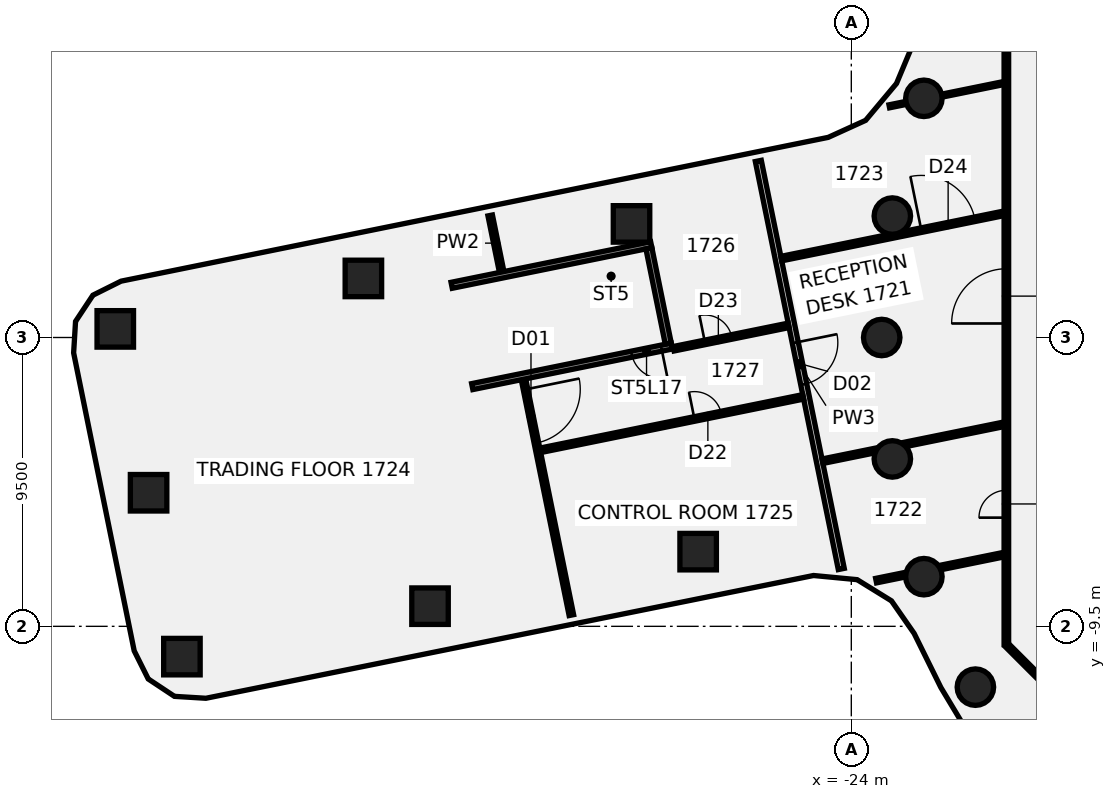
"""IFC4 building model, lengths in metres.
Left out: names, types, materials, properties, quantities, classifications, styles, units other than length and angle.
Written with IfcOpenShell. Run it as: python <this file> out.ifc"""

import sys

from ifc_helpers import new_model, si_unit, direction, frame, frame_2d, origin, origin_2d, place, context, subcontext, project, spatial, polyline, rectangle, circle, outline, extrude, element, fill, save


model = new_model("IFC4")
c1 = context("Model", 3, precision=1e-05, world=origin(), true_north=direction((0.0, 1.0)))
c2 = subcontext(c1, "Body", "Model", "MODEL_VIEW")
j1 = project(units=[si_unit("LENGTHUNIT", "METRE"), si_unit("PLANEANGLEUNIT", "RADIAN")], contexts=[c1])
p1 = place(None, origin())
s1 = spatial("IfcSite", under=j1, at=p1, CompositionType="ELEMENT")
p2 = place(p1, origin())
s2 = spatial("IfcBuilding", under=s1, at=p2, CompositionType="ELEMENT")
p3 = place(p2, frame((0.0, 0.0, 75.25)))
s3 = spatial("IfcBuildingStorey", under=s2, at=p3, CompositionType="ELEMENT", Elevation=75.25)
for number, where, z_axis, x_axis in (
    (1, (-21.613, 7.866, -0.14), (0.0, 0.0, 1.0), (1.0, 0.0, 0.0)),
    (2, (-22.651, 3.994, -0.14), (0.0, 0.0, 1.0), (1.0, 0.0, 0.0)),
    (3, (-23.0, 0.0, -0.14), (0.0, 0.0, 1.0), (1.0, 0.0, 0.0)),
    (4, (-22.651, -3.994, -0.14), (0.0, 0.0, 1.0), (1.0, 0.0, 0.0)),
    (5, (-21.613, -7.866, -0.14), (0.0, 0.0, 1.0), (1.0, 0.0, 0.0)),
    (6, (-19.919, -11.5, -0.14), (0.0, 0.0, 1.0), (1.0, 0.0, 0.0)),
):
    element("IfcColumn", number, at=place(p3, frame(where, z_axis=z_axis, x_axis=x_axis)), inside=s3, PredefinedType="COLUMN", context=c2, shape_type="SweptSolid", body=[
        extrude(circle(Radius=0.6, at=origin_2d()), origin(), (0.0, 0.0, 1.0), 3.71),
    ])
p4 = place(p3, frame((-37.857, -8.837, -0.138), z_axis=(0.043948835728, -0.07725535249, 0.996042223176), x_axis=(-0.197093187203, 0.97674033462, 0.084454687756)))
e7 = element("IfcColumn", 7, at=p4, inside=s3, PredefinedType="COLUMN", context=c2, shape_type="SweptSolid", body=[
    extrude(rectangle(XDim=1.2, YDim=1.2, at=origin_2d()), origin(), (0.0, 0.0, 1.0), 3.716),
])
p5 = place(p3, frame((-40.049, 1.943, -0.138), z_axis=(-0.008673247864, -0.088440845648, 0.996043669521), x_axis=(0.979765603585, 0.198432607845, 0.026150758614)))
e8 = element("IfcColumn", 8, at=p5, inside=s3, PredefinedType="COLUMN", context=c2, shape_type="SweptSolid", body=[
    extrude(rectangle(XDim=1.2, YDim=1.2, at=origin_2d()), origin(), (0.0, 0.0, 1.0), 3.716),
])
p6 = place(p3, frame((-29.038, -7.043, -0.139), z_axis=(0.034891014198, -0.034232693176, 0.998804655499), x_axis=(-0.198537646121, 0.979256198152, 0.040498166061)))
e9 = element("IfcColumn", 9, at=p6, inside=s3, PredefinedType="COLUMN", context=c2, shape_type="SweptSolid", body=[
    extrude(rectangle(XDim=1.2, YDim=1.2, at=origin_2d()), origin(), (0.0, 0.0, 1.0), 3.708),
])
p7 = place(p3, frame((-31.229, 3.736, -0.139), z_axis=(-0.017907556487, -0.045427257265, 0.99880713039), x_axis=(0.979708767156, 0.198653368973, 0.026600198356)))
e10 = element("IfcColumn", 10, at=p7, inside=s3, PredefinedType="COLUMN", context=c2, shape_type="SweptSolid", body=[
    extrude(rectangle(XDim=1.2, YDim=1.2, at=origin_2d()), origin(), (0.0, 0.0, 1.0), 3.708),
])
p8 = place(p3, frame((-48.21, 0.283, -0.138), z_axis=(0.002356773352, -0.127200295059, 0.991874251383), x_axis=(0.979992577374, 0.197697779503, 0.023024688323)))
e11 = element("IfcColumn", 11, at=p8, inside=s3, PredefinedType="COLUMN", context=c2, shape_type="SweptSolid", body=[
    extrude(rectangle(XDim=1.2, YDim=1.2, at=origin_2d()), origin(), (0.0, 0.0, 1.0), 3.729),
])
p9 = place(p3, frame((-47.114, -5.106, -0.138), z_axis=(0.028607271039, -0.121695461927, 0.992155148447), x_axis=(-0.197441138054, 0.972318457177, 0.124955251334)))
e12 = element("IfcColumn", 12, at=p9, inside=s3, PredefinedType="COLUMN", context=c2, shape_type="SweptSolid", body=[
    extrude(rectangle(XDim=1.2, YDim=1.2, at=origin_2d()), origin(), (0.0, 0.0, 1.0), 3.729),
])
p10 = place(p3, frame((-46.018, -10.496, -0.138), z_axis=(0.054848749218, -0.116046339335, 0.991728219744), x_axis=(-0.1960216138, 0.972644227532, 0.124654456691)))
e13 = element("IfcColumn", 13, at=p10, inside=s3, PredefinedType="COLUMN", context=c2, shape_type="SweptSolid", body=[
    extrude(rectangle(XDim=1.2, YDim=1.2, at=origin_2d()), origin(), (0.0, 0.0, 1.0), 3.73),
])
p11 = place(p3, frame((-35.878, 4.014, 0.0), z_axis=(0.0, 0.0, 1.0), x_axis=(0.199020498729, -0.979995327073, 0.0)))
e14 = element("IfcWall", 14, at=p11, inside=s3, PredefinedType="PARTITIONING", context=c2, shape_type="SweptSolid", body=[
    extrude(rectangle(XDim=1.858, YDim=0.15, at=frame_2d((0.929, 0.0))), origin(), (0.0, 0.0, 1.0), 2.97),
])
p12 = place(p3, frame((-34.775, -1.414, 0.0), z_axis=(0.0, 0.0, 1.0), x_axis=(0.199048758303, -0.979989587607, 0.0)))
e15 = element("IfcWall", 15, at=p12, inside=s3, PredefinedType="PARTITIONING", context=c2, shape_type="SweptSolid", body=[
    extrude(rectangle(XDim=7.874, YDim=0.15, at=frame_2d((3.937, 0.0))), origin(), (0.0, 0.0, 1.0), 2.97),
])
p13 = place(p12, frame((0.3, 0.0, 0.0)))
e16 = element("IfcOpeningElement", 16, at=p13, cuts=e15, PredefinedType="OPENING", context=c2, shape_type="SweptSolid", body=[
    extrude(rectangle(XDim=1.8, YDim=2.1, at=frame_2d((0.9, 1.05))), frame((0.0, 0.085, 0.0), z_axis=(0.0, -1.0, 0.0), x_axis=(1.0, 0.0, 0.0)), (0.0, 0.0, 1.0), 0.17),
])
p14 = place(p3, frame((-27.059, 5.808, 0.0), z_axis=(0.0, 0.0, 1.0), x_axis=(0.199248511138, -0.979948993984, 0.0)))
e17 = element("IfcWall", 17, at=p14, inside=s3, PredefinedType="PARTITIONING", context=c2, shape_type="SweptSolid", body=[
    extrude(rectangle(XDim=13.695, YDim=0.2, at=frame_2d((6.848, 0.0))), origin(), (0.0, 0.0, 1.0), 2.87),
])
p15 = place(p14, frame((6.099, 0.0, 0.0)))
e18 = element("IfcOpeningElement", 18, at=p15, cuts=e17, PredefinedType="OPENING", context=c2, shape_type="SweptSolid", body=[
    extrude(rectangle(XDim=1.4, YDim=2.1, at=frame_2d((0.7, 1.05))), frame((0.0, 0.11, 0.0), z_axis=(0.0, -1.0, 0.0), x_axis=(1.0, 0.0, 0.0)), (0.0, 0.0, 1.0), 0.22),
])
p16 = place(p3, frame((-18.872, -10.128, 0.0), z_axis=(0.0, 0.0, 1.0), x_axis=(0.707106781187, -0.707106781187, 0.0)))
e19 = element("IfcWall", 19, at=p16, inside=s3, PredefinedType="PARTITIONING", context=c2, shape_type="SweptSolid", body=[
    extrude(rectangle(XDim=2.465, YDim=0.15, at=frame_2d((1.232, 0.0))), origin(), (0.0, 0.0, 1.0), 2.97),
])
p17 = place(p3, frame((-34.23, -3.711, 0.0), z_axis=(0.0, 0.0, 1.0), x_axis=(0.979947834189, 0.199254215184, 0.0)))
e20 = element("IfcWall", 20, at=p17, inside=s3, PredefinedType="PARTITIONING", context=c2, shape_type="SweptSolid", body=[
    extrude(rectangle(XDim=8.824, YDim=0.15, at=frame_2d((4.412, 0.0))), origin(), (0.0, 0.0, 1.0), 2.87),
])
p18 = place(p17, frame((5.175, 0.0, 0.0)))
e21 = element("IfcOpeningElement", 21, at=p18, cuts=e20, PredefinedType="OPENING", context=c2, shape_type="SweptSolid", body=[
    extrude(rectangle(XDim=0.9, YDim=2.1, at=frame_2d((0.45, 1.05))), frame((0.0, 0.085, 0.0), z_axis=(0.0, -1.0, 0.0), x_axis=(1.0, 0.0, 0.0)), (0.0, 0.0, 1.0), 0.17),
])
p19 = place(p3, frame((-29.844, -0.37, 0.0), z_axis=(0.0, 0.0, 1.0), x_axis=(0.979938127912, 0.199301945462, 0.0)))
e22 = element("IfcWall", 22, at=p19, inside=s3, PredefinedType="PARTITIONING", context=c2, shape_type="SweptSolid", body=[
    extrude(rectangle(XDim=3.86, YDim=0.15, at=frame_2d((1.93, 0.0))), origin(), (0.0, 0.0, 1.0), 2.87),
])
p20 = place(p19, frame((1.05, 0.0, 0.0)))
e23 = element("IfcOpeningElement", 23, at=p20, cuts=e22, PredefinedType="OPENING", context=c2, shape_type="SweptSolid", body=[
    extrude(rectangle(XDim=0.9, YDim=2.1, at=frame_2d((0.45, 1.05))), frame((0.0, 0.085, 0.0), z_axis=(0.0, -1.0, 0.0), x_axis=(1.0, 0.0, 0.0)), (0.0, 0.0, 1.0), 0.17),
])
p21 = place(p3, frame((-26.303, 2.595, 0.0), z_axis=(0.0, 0.0, 1.0), x_axis=(0.979950490728, 0.19924114967, 0.0)))
e24 = element("IfcWall", 24, at=p21, inside=s3, PredefinedType="PARTITIONING", context=c2, shape_type="SweptSolid", body=[
    extrude(rectangle(XDim=7.479, YDim=0.15, at=frame_2d((3.74, 0.0))), origin(), (0.0, 0.0, 1.0), 2.87),
])
p22 = place(p21, frame((4.7, 0.0, 0.0)))
e25 = element("IfcOpeningElement", 25, at=p22, cuts=e24, PredefinedType="OPENING", context=c2, shape_type="SweptSolid", body=[
    extrude(rectangle(XDim=1.8, YDim=2.1, at=frame_2d((0.9, 1.05))), frame((0.0, 0.085, 0.0), z_axis=(0.0, -1.0, 0.0), x_axis=(1.0, 0.0, 0.0)), (0.0, 0.0, 1.0), 0.17),
])
p23 = place(p3, frame((-24.948, -4.069, 0.0), z_axis=(0.0, 0.0, 1.0), x_axis=(0.979938907772, 0.199298110967, 0.0)))
e26 = element("IfcWall", 26, at=p23, inside=s3, PredefinedType="PARTITIONING", context=c2, shape_type="SweptSolid", body=[
    extrude(rectangle(XDim=1.8, YDim=0.15, at=frame_2d((0.9, 0.0))), origin(), (0.0, 0.0, 1.0), 2.87),
])
p24 = place(p3, frame((-22.284, -3.527, 0.0), z_axis=(0.0, 0.0, 1.0), x_axis=(0.979950296152, 0.199242106673, 0.0)))
e27 = element("IfcWall", 27, at=p24, inside=s3, PredefinedType="PARTITIONING", context=c2, shape_type="SweptSolid", body=[
    extrude(rectangle(XDim=3.378, YDim=0.15, at=frame_2d((1.689, 0.0))), origin(), (0.0, 0.0, 1.0), 2.97),
])
p25 = place(p3, frame((-22.751, 7.603, 0.0), z_axis=(0.0, 0.0, 1.0), x_axis=(0.980025828953, 0.1988702456, 0.0)))
e28 = element("IfcWall", 28, at=p25, inside=s3, PredefinedType="PARTITIONING", context=c2, shape_type="SweptSolid", body=[
    extrude(rectangle(XDim=0.579, YDim=0.1, at=frame_2d((0.29, 0.0))), origin(), (0.0, 0.0, 1.0), 2.97),
])
p26 = place(p3, frame((-21.026, 7.954, 0.0), z_axis=(0.0, 0.0, 1.0), x_axis=(0.979967824394, 0.19915587652, 0.0)))
e29 = element("IfcWall", 29, at=p26, inside=s3, PredefinedType="PARTITIONING", context=c2, shape_type="SweptSolid", body=[
    extrude(rectangle(XDim=2.1, YDim=0.1, at=frame_2d((1.05, 0.0))), origin(), (0.0, 0.0, 1.0), 2.97),
])
p27 = place(p3, frame((-23.185, -7.997, 0.0), z_axis=(0.0, 0.0, 1.0), x_axis=(0.979965738982, 0.199166137736, 0.0)))
e30 = element("IfcWall", 30, at=p27, inside=s3, PredefinedType="PARTITIONING", context=c2, shape_type="SweptSolid", body=[
    extrude(rectangle(XDim=1.0, YDim=0.15, at=frame_2d((0.5, 0.0))), origin(), (0.0, 0.0, 1.0), 2.97),
])
p28 = place(p3, frame((-21.083, -7.569, 0.0), z_axis=(0.0, 0.0, 1.0), x_axis=(0.979916380724, 0.199408843305, 0.0)))
e31 = element("IfcWall", 31, at=p28, inside=s3, PredefinedType="PARTITIONING", context=c2, shape_type="SweptSolid", body=[
    extrude(rectangle(XDim=2.152, YDim=0.15, at=frame_2d((1.076, 0.0))), origin(), (0.0, 0.0, 1.0), 2.97),
])
p29 = place(p3, frame((-18.9, -10.1, 0.0), z_axis=(0.0, 0.0, 1.0), x_axis=(0.0, 1.0, 0.0)))
e32 = element("IfcWall", 32, at=p29, inside=s3, PredefinedType="PARTITIONING", context=c2, shape_type="SweptSolid", body=[
    extrude(rectangle(XDim=20.2, YDim=0.15, at=frame_2d((10.1, 0.0))), origin(), (0.0, 0.0, 1.0), 2.97),
])
p30 = place(p29, frame((10.561, 0.0, 0.0)))
e33 = element("IfcOpeningElement", 33, at=p30, cuts=e32, PredefinedType="OPENING", context=c2, shape_type="SweptSolid", body=[
    extrude(rectangle(XDim=1.8, YDim=2.1, at=frame_2d((0.9, 1.05))), frame((0.0, 0.085, 0.0), z_axis=(0.0, -1.0, 0.0), x_axis=(1.0, 0.0, 0.0)), (0.0, 0.0, 1.0), 0.17),
])
p31 = place(p29, frame((4.175, 0.0, 0.0)))
e34 = element("IfcOpeningElement", 34, at=p31, cuts=e32, PredefinedType="OPENING", context=c2, shape_type="SweptSolid", body=[
    extrude(rectangle(XDim=0.9, YDim=2.1, at=frame_2d((0.45, 1.05))), frame((0.0, 0.085, 0.0), z_axis=(0.0, -1.0, 0.0), x_axis=(1.0, 0.0, 0.0)), (0.0, 0.0, 1.0), 0.17),
])
p32 = place(p3, frame((-29.903, -0.28, -0.14), z_axis=(0.0, 0.0, 1.0), x_axis=(-0.979956319534, -0.199212479042, 0.0)))
e35 = element("IfcWall", 35, at=p32, inside=s3, PredefinedType="SHEAR", context=c2, shape_type="SweptSolid", body=[
    extrude(rectangle(XDim=6.7, YDim=0.2, at=frame_2d((3.35, 0.0))), origin(), (0.0, 0.0, 1.0), 3.01),
])
p33 = place(p32, frame((0.35, 0.0, 0.0)))
e36 = element("IfcOpeningElement", 36, at=p33, cuts=e35, PredefinedType="OPENING", context=c2, shape_type="SweptSolid", body=[
    extrude(rectangle(XDim=1.0, YDim=2.1, at=frame_2d((0.5, 1.05))), frame((0.0, 0.11, 0.0), z_axis=(0.0, -1.0, 0.0), x_axis=(1.0, 0.0, 0.0)), (0.0, 0.0, 1.0), 0.22),
])
p34 = place(p3, frame((-30.58, 3.052, -0.14), z_axis=(0.0, 0.0, 1.0), x_axis=(-0.979949205339, -0.199247471639, 0.0)))
e37 = element("IfcWall", 37, at=p34, inside=s3, PredefinedType="SHEAR", context=c2, shape_type="SweptSolid", body=[
    extrude(rectangle(XDim=6.7, YDim=0.2, at=frame_2d((3.35, 0.0))), origin(), (0.0, 0.0, 1.0), 3.01),
])
p35 = place(p3, frame((-30.658, 2.934, -0.14), z_axis=(0.0, 0.0, 1.0), x_axis=(0.199284316026, -0.97994171326, 0.0)))
e38 = element("IfcWall", 38, at=p35, inside=s3, PredefinedType="SHEAR", context=c2, shape_type="SweptSolid", body=[
    extrude(rectangle(XDim=3.2, YDim=0.2, at=frame_2d((1.6, 0.0))), origin(), (0.0, 0.0, 1.0), 3.01),
])
p36 = place(p3, frame((0.0, 0.0, -0.14)))
e39 = element("IfcWall", 39, at=p36, inside=s3, PredefinedType="SHEAR", context=c2, shape_type="SweptSolid", body=[
    extrude(outline(polyline([(-36.93, 1.659), (-37.126, 1.619), (-36.488, -1.517), (-36.292, -1.477), (-36.93, 1.659)])), origin(), (0.0, 0.0, 1.0), 3.01),
])
p37 = place(p13, frame((1.8, 0.0, 0.0), z_axis=(0.0, 0.0, 1.0), x_axis=(-1.0, 0.0, 0.0)))
e40 = element("IfcDoor", 40, at=p37, inside=s3, OperationType="DOUBLE_DOOR_SINGLE_SWING", PredefinedType="DOOR", context=c2, shape_type="SweptSolid", body=[
    extrude(rectangle(XDim=1.8, YDim=2.1, at=frame_2d((0.9, 1.05))), frame((0.0, 0.025, 0.0), z_axis=(0.0, -1.0, 0.0), x_axis=(1.0, 0.0, 0.0)), (0.0, 0.0, 1.0), 0.05),
])
fill(e16, e40)
p38 = place(p15, origin())
e41 = element("IfcDoor", 41, at=p38, inside=s3, OperationType="DOUBLE_DOOR_SINGLE_SWING", PredefinedType="DOOR", context=c2, shape_type="SweptSolid", body=[
    extrude(rectangle(XDim=1.4, YDim=2.1, at=frame_2d((0.7, 1.05))), frame((0.0, 0.025, 0.0), z_axis=(0.0, -1.0, 0.0), x_axis=(1.0, 0.0, 0.0)), (0.0, 0.0, 1.0), 0.05),
])
fill(e18, e41)
p39 = place(p18, frame((0.9, 0.0, 0.0), z_axis=(0.0, 0.0, 1.0), x_axis=(-1.0, 0.0, 0.0)))
e42 = element("IfcDoor", 42, at=p39, inside=s3, OperationType="SINGLE_SWING_RIGHT", PredefinedType="DOOR", context=c2, shape_type="SweptSolid", body=[
    extrude(rectangle(XDim=0.9, YDim=2.1, at=frame_2d((0.45, 1.05))), frame((0.0, 0.025, 0.0), z_axis=(0.0, -1.0, 0.0), x_axis=(1.0, 0.0, 0.0)), (0.0, 0.0, 1.0), 0.05),
])
fill(e21, e42)
p40 = place(p20, origin())
e43 = element("IfcDoor", 43, at=p40, inside=s3, OperationType="SINGLE_SWING_RIGHT", PredefinedType="DOOR", context=c2, shape_type="SweptSolid", body=[
    extrude(rectangle(XDim=0.9, YDim=2.1, at=frame_2d((0.45, 1.05))), frame((0.0, 0.025, 0.0), z_axis=(0.0, -1.0, 0.0), x_axis=(1.0, 0.0, 0.0)), (0.0, 0.0, 1.0), 0.05),
])
fill(e23, e43)
p41 = place(p22, origin())
e44 = element("IfcDoor", 44, at=p41, inside=s3, OperationType="DOUBLE_DOOR_SINGLE_SWING", PredefinedType="DOOR", context=c2, shape_type="SweptSolid", body=[
    extrude(rectangle(XDim=1.8, YDim=2.1, at=frame_2d((0.9, 1.05))), frame((0.0, 0.025, 0.0), z_axis=(0.0, -1.0, 0.0), x_axis=(1.0, 0.0, 0.0)), (0.0, 0.0, 1.0), 0.05),
])
fill(e25, e44)
p42 = place(p30, frame((1.8, 0.0, 0.0), z_axis=(0.0, 0.0, 1.0), x_axis=(-1.0, 0.0, 0.0)))
e45 = element("IfcDoor", 45, at=p42, inside=s3, OperationType="DOUBLE_DOOR_SINGLE_SWING", PredefinedType="DOOR", context=c2, shape_type="SweptSolid", body=[
    extrude(rectangle(XDim=1.8, YDim=2.1, at=frame_2d((0.9, 1.05))), frame((0.0, 0.025, 0.0), z_axis=(0.0, -1.0, 0.0), x_axis=(1.0, 0.0, 0.0)), (0.0, 0.0, 1.0), 0.05),
])
fill(e33, e45)
p43 = place(p31, origin())
e46 = element("IfcDoor", 46, at=p43, inside=s3, OperationType="SINGLE_SWING_RIGHT", PredefinedType="DOOR", context=c2, shape_type="SweptSolid", body=[
    extrude(rectangle(XDim=0.9, YDim=2.1, at=frame_2d((0.45, 1.05))), frame((0.0, 0.025, 0.0), z_axis=(0.0, -1.0, 0.0), x_axis=(1.0, 0.0, 0.0)), (0.0, 0.0, 1.0), 0.05),
])
fill(e34, e46)
p44 = place(p33, origin())
e47 = element("IfcDoor", 47, at=p44, inside=s3, OperationType="SINGLE_SWING_LEFT", PredefinedType="DOOR", context=c2, shape_type="SweptSolid", body=[
    extrude(rectangle(XDim=1.0, YDim=2.1, at=frame_2d((0.5, 1.05))), frame((0.0, 0.025, 0.0), z_axis=(0.0, -1.0, 0.0), x_axis=(1.0, 0.0, 0.0)), (0.0, 0.0, 1.0), 0.05),
])
fill(e36, e47)
save(model, sys.argv[1])
